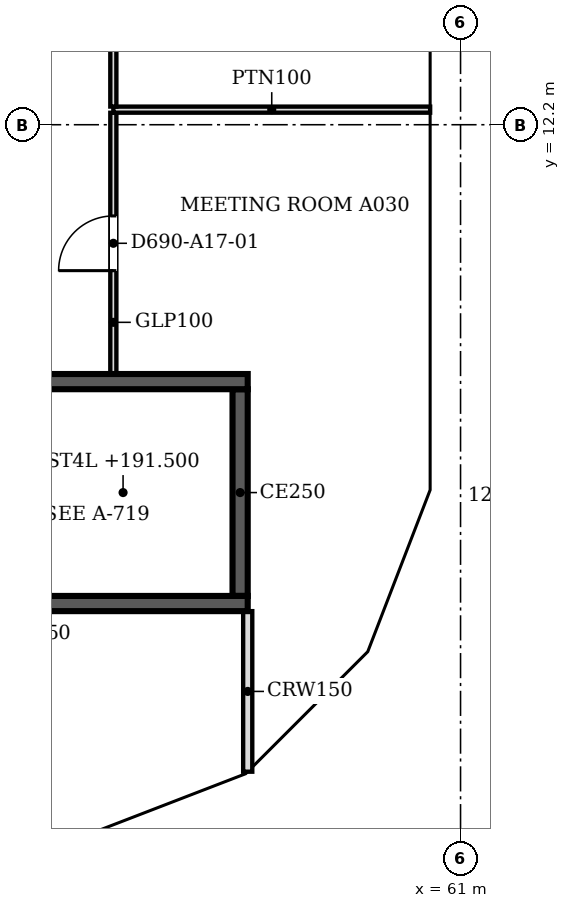
"""IFC4 building model, lengths in metres.
Left out: names, types, materials, properties, quantities, classifications, styles, units other than length and angle.
Written with IfcOpenShell. Run it as: python <this file> out.ifc"""

import sys

from ifc_helpers import new_model, si_unit, direction, frame, frame_2d, origin, place, context, subcontext, project, spatial, polyline, rectangle, outline, extrude, faceted_brep, source, transform, mapped, element, fill, save


model = new_model("IFC4")
c1 = context("Model", 3, precision=1e-05, world=origin(), true_north=direction((0.0, 1.0)))
c2 = subcontext(c1, "Body", "Model", "MODEL_VIEW")
j1 = project(units=[si_unit("LENGTHUNIT", "METRE"), si_unit("PLANEANGLEUNIT", "RADIAN")], contexts=[c1])
p1 = place(None, origin())
s1 = spatial("IfcSite", under=j1, at=p1, CompositionType="ELEMENT")
p2 = place(p1, origin())
s2 = spatial("IfcBuilding", under=s1, at=p2, CompositionType="ELEMENT")
p3 = place(p2, frame((0.0, 0.0, 189.6)))
s3 = spatial("IfcBuildingStorey", under=s2, at=p3, CompositionType="ELEMENT", Elevation=189.6)
m1 = source(origin(), c2, "Body", "Brep", [
    faceted_brep([(2.95, -0.25, 0.0), (3.003, -0.25, 0.068), (3.003, -0.25, 7.531), (2.95, -0.25, 7.6), (0.0, -0.25, 3.8), (0.047, 0.25, 3.86), (2.898, 0.25, 7.532), (2.898, 0.25, 0.068), (0.047, 0.25, 3.74), (2.95, 0.0, 0.0), (2.95, 0.0, 7.6), (0.0, 0.0, 3.8)], [[[0, 1, 2, 3, 4]], [[5, 6, 7, 8]], [[1, 0, 9]], [[10, 3, 2]], [[6, 5, 11, 4, 3, 10]], [[8, 7, 9, 0, 4, 11]], [[8, 11, 5]], [[1, 9, 7, 6, 10, 2]]]),
])
p4 = place(p3, frame((54.854, 0.25, -3.8), z_axis=(0.0, 0.0, 1.0), x_axis=(0.932970071518, 0.359953949349, 0.0)))
e1 = element("IfcWall", 1, at=p4, inside=s3, PredefinedType="SOLIDWALL", context=c2, shape_type="MappedRepresentation", body=[
    mapped(m1, transform((0.0, 0.0, 0.0), scale=1.0)),
])
m2 = source(origin(), c2, "Body", "SweptSolid", [
    extrude(outline(polyline([(2.75, 6.935), (0.316, 3.8), (2.75, 0.665), (2.75, 6.935)])), frame((0.0, 0.26, 0.0), z_axis=(0.0, -1.0, 0.0), x_axis=(1.0, 0.0, 0.0)), (0.0, 0.0, 1.0), 0.52),
])
p5 = place(p4, origin())
e2 = element("IfcOpeningElement", 2, at=p5, cuts=e1, PredefinedType="OPENING", context=c2, shape_type="MappedRepresentation", body=[
    mapped(m2, transform((0.0, 0.0, 0.0), scale=1.0)),
])
m3 = source(origin(), c2, "Body", "Brep", [
    faceted_brep([(0.053, -0.25, 0.0), (2.997, -0.25, 3.8), (0.053, -0.25, 7.6), (0.0, -0.25, 7.532), (0.0, -0.25, 0.068), (0.106, 0.25, 7.531), (2.944, 0.25, 3.868), (2.944, 0.25, 3.732), (0.106, 0.25, 0.068), (2.997, 0.0, 3.8), (0.053, 0.0, 0.0), (0.053, 0.0, 7.6)], [[[0, 1, 2, 3, 4]], [[5, 6, 7, 8]], [[8, 7, 9, 1, 0, 10]], [[6, 5, 11, 2, 1, 9]], [[3, 2, 11]], [[10, 0, 4]], [[8, 10, 4, 3, 11, 5]], [[7, 6, 9]]]),
])
p6 = place(p3, frame((57.569, 1.274, -3.8), z_axis=(0.0, 0.0, 1.0), x_axis=(0.707066050402, 0.707147509625, 0.0)))
e3 = element("IfcWall", 3, at=p6, inside=s3, PredefinedType="SOLIDWALL", context=c2, shape_type="MappedRepresentation", body=[
    mapped(m3, transform((0.0, 0.0, 0.0), scale=1.0)),
])
m4 = source(origin(), c2, "Body", "SweptSolid", [
    extrude(outline(polyline([(0.253, 0.666), (2.681, 3.8), (0.253, 6.934), (0.253, 0.666)])), frame((0.0, 0.26, 0.0), z_axis=(0.0, -1.0, 0.0), x_axis=(1.0, 0.0, 0.0)), (0.0, 0.0, 1.0), 0.52),
])
p7 = place(p6, origin())
e4 = element("IfcOpeningElement", 4, at=p7, cuts=e3, PredefinedType="OPENING", context=c2, shape_type="MappedRepresentation", body=[
    mapped(m4, transform((0.0, 0.0, 0.0), scale=1.0)),
])
m5 = source(origin(), c2, "Body", "Brep", [
    faceted_brep([(2.95, -0.25, 0.0), (2.997, -0.25, 0.059), (2.997, -0.25, 7.541), (2.95, -0.25, 7.6), (0.0, -0.25, 3.8), (0.053, 0.25, 3.868), (2.904, 0.25, 7.54), (2.904, 0.25, 0.06), (0.053, 0.25, 3.732), (2.95, 0.0, 0.0), (2.95, 0.0, 7.6), (0.0, 0.0, 3.8)], [[[0, 1, 2, 3, 4]], [[5, 6, 7, 8]], [[1, 0, 9]], [[10, 3, 2]], [[6, 5, 11, 4, 3, 10]], [[8, 7, 9, 0, 4, 11]], [[8, 11, 5]], [[1, 9, 7, 6, 10, 2]]]),
])
p8 = place(p3, frame((59.688, 3.394, -3.8), z_axis=(0.0, 0.0, 1.0), x_axis=(0.359972353723, 0.932962970624, 0.0)))
e5 = element("IfcWall", 5, at=p8, inside=s3, PredefinedType="SOLIDWALL", context=c2, shape_type="MappedRepresentation", body=[
    mapped(m5, transform((0.0, 0.0, 0.0), scale=1.0)),
])
p9 = place(p8, origin())
e6 = element("IfcOpeningElement", 6, at=p9, cuts=e5, PredefinedType="OPENING", context=c2, shape_type="MappedRepresentation", body=[
    mapped(m2, transform((0.0, 0.0, 0.0), scale=1.0)),
])
m6 = source(origin(), c2, "Body", "Brep", [
    faceted_brep([(0.047, -0.25, 0.0), (3.05, -0.25, 3.8), (0.047, -0.25, 7.6), (0.0, -0.25, 7.54), (0.0, -0.25, 0.06), (0.093, 0.25, 7.541), (3.05, 0.25, 3.8), (0.093, 0.25, 0.059), (0.047, 0.0, 0.0), (0.047, 0.0, 7.6)], [[[0, 1, 2, 3, 4]], [[5, 6, 7]], [[7, 6, 1, 0, 8]], [[6, 5, 9, 2, 1]], [[3, 2, 9]], [[8, 0, 4]], [[7, 8, 4, 3, 9, 5]]]),
])
p10 = place(p3, frame((60.75, 6.1, -3.8), z_axis=(0.0, 0.0, 1.0), x_axis=(0.0, 1.0, 0.0)))
e7 = element("IfcWall", 7, at=p10, inside=s3, PredefinedType="SOLIDWALL", context=c2, shape_type="MappedRepresentation", body=[
    mapped(m6, transform((0.0, 0.0, 0.0), scale=1.0)),
])
m7 = source(origin(), c2, "Body", "SweptSolid", [
    extrude(outline(polyline([(0.247, 0.656), (2.731, 3.8), (0.247, 6.944), (0.247, 0.656)])), frame((0.0, 0.26, 0.0), z_axis=(0.0, -1.0, 0.0), x_axis=(1.0, 0.0, 0.0)), (0.0, 0.0, 1.0), 0.52),
])
p11 = place(p10, origin())
e8 = element("IfcOpeningElement", 8, at=p11, cuts=e7, PredefinedType="OPENING", context=c2, shape_type="MappedRepresentation", body=[
    mapped(m7, transform((0.0, 0.0, 0.0), scale=1.0)),
])
m8 = source(origin(), c2, "Body", "SweptSolid", [
    extrude(outline(polyline([(3.05, 0.0), (6.1, 3.8), (3.05, 7.6), (0.0, 3.8), (3.05, 0.0)])), frame((0.0, 0.25, 0.0), z_axis=(0.0, -1.0, 0.0), x_axis=(1.0, 0.0, 0.0)), (0.0, 0.0, 1.0), 0.5),
])
p12 = place(p3, frame((60.75, 9.15, -3.8), z_axis=(0.0, 0.0, 1.0), x_axis=(0.0, 1.0, 0.0)))
e9 = element("IfcWall", 9, at=p12, inside=s3, PredefinedType="SOLIDWALL", context=c2, shape_type="MappedRepresentation", body=[
    mapped(m8, transform((0.0, 0.0, 0.0), scale=1.0)),
])
m9 = source(origin(), c2, "Body", "SweptSolid", [
    extrude(outline(polyline([(3.05, 0.399), (5.78, 3.8), (3.05, 7.2), (0.321, 3.8), (3.05, 0.399)])), frame((0.0, 0.26, 0.0), z_axis=(0.0, -1.0, 0.0), x_axis=(1.0, 0.0, 0.0)), (0.0, 0.0, 1.0), 0.52),
])
p13 = place(p12, origin())
e10 = element("IfcOpeningElement", 10, at=p13, cuts=e9, PredefinedType="OPENING", context=c2, shape_type="MappedRepresentation", body=[
    mapped(m9, transform((0.0, 0.0, 0.0), scale=1.0)),
])
m10 = source(origin(), c2, "Body", "Brep", [
    faceted_brep([(0.047, -0.25, 0.0), (2.997, -0.25, 3.8), (0.0, -0.25, 3.8), (0.0, -0.25, 0.059), (0.093, 0.25, 3.8), (2.944, 0.25, 3.8), (2.944, 0.25, 3.732), (0.093, 0.25, 0.06), (2.997, 0.0, 3.8), (0.047, 0.0, 0.0)], [[[0, 1, 2, 3]], [[4, 5, 6, 7]], [[7, 6, 8, 1, 0, 9]], [[5, 4, 2, 1, 8]], [[9, 0, 3]], [[7, 9, 3, 2, 4]], [[6, 5, 8]]]),
])
p14 = place(p3, frame((54.81, 0.233, 0.0), z_axis=(0.0, 0.0, 1.0), x_axis=(0.932990326376, 0.359901446078, 0.0)))
e11 = element("IfcWall", 11, at=p14, inside=s3, PredefinedType="SOLIDWALL", context=c2, shape_type="MappedRepresentation", body=[
    mapped(m10, transform((0.0, 0.0, 0.0), scale=1.0)),
])
m11 = source(origin(), c2, "Body", "SweptSolid", [
    extrude(outline(polyline([(0.247, 0.665), (2.487, 3.55), (0.247, 3.55), (0.247, 0.665)])), frame((0.0, 0.26, 0.0), z_axis=(0.0, -1.0, 0.0), x_axis=(1.0, 0.0, 0.0)), (0.0, 0.0, 1.0), 0.52),
])
p15 = place(p14, origin())
e12 = element("IfcOpeningElement", 12, at=p15, cuts=e11, PredefinedType="OPENING", context=c2, shape_type="MappedRepresentation", body=[
    mapped(m11, transform((0.0, 0.0, 0.0), scale=1.0)),
])
m12 = source(origin(), c2, "Body", "Brep", [
    faceted_brep([(2.944, -0.25, 0.0), (2.997, -0.25, 0.068), (2.997, -0.25, 3.8), (0.0, -0.25, 3.8), (0.053, 0.25, 3.8), (2.891, 0.25, 3.8), (2.891, 0.25, 0.068), (0.053, 0.25, 3.731), (2.944, 0.0, 0.0), (0.0, 0.0, 3.8)], [[[0, 1, 2, 3]], [[4, 5, 6, 7]], [[1, 0, 8]], [[5, 4, 9, 3, 2]], [[7, 6, 8, 0, 3, 9]], [[7, 9, 4]], [[1, 8, 6, 5, 2]]]),
])
p16 = place(p3, frame((57.606, 1.312, 0.0), z_axis=(0.0, 0.0, 1.0), x_axis=(0.707147509625, 0.707066050402, 0.0)))
e13 = element("IfcWall", 13, at=p16, inside=s3, PredefinedType="SOLIDWALL", context=c2, shape_type="MappedRepresentation", body=[
    mapped(m12, transform((0.0, 0.0, 0.0), scale=1.0)),
])
m13 = source(origin(), c2, "Body", "SweptSolid", [
    extrude(outline(polyline([(2.744, 3.55), (0.51, 3.55), (2.744, 0.666), (2.744, 3.55)])), frame((0.0, 0.26, 0.0), z_axis=(0.0, -1.0, 0.0), x_axis=(1.0, 0.0, 0.0)), (0.0, 0.0, 1.0), 0.52),
])
p17 = place(p16, origin())
e14 = element("IfcOpeningElement", 14, at=p17, cuts=e13, PredefinedType="OPENING", context=c2, shape_type="MappedRepresentation", body=[
    mapped(m13, transform((0.0, 0.0, 0.0), scale=1.0)),
])
m14 = source(origin(), c2, "Body", "Brep", [
    faceted_brep([(0.053, -0.25, 0.0), (3.003, -0.25, 3.8), (0.0, -0.25, 3.8), (0.0, -0.25, 0.068), (0.106, 0.25, 3.8), (2.957, 0.25, 3.8), (2.957, 0.25, 3.74), (0.106, 0.25, 0.068), (3.003, 0.0, 3.8), (0.053, 0.0, 0.0)], [[[0, 1, 2, 3]], [[4, 5, 6, 7]], [[7, 6, 8, 1, 0, 9]], [[5, 4, 2, 1, 8]], [[9, 0, 3]], [[7, 9, 3, 2, 4]], [[6, 5, 8]]]),
])
p18 = place(p3, frame((59.669, 3.344, 0.0), z_axis=(0.0, 0.0, 1.0), x_axis=(0.35992665181, 0.932980602862, 0.0)))
e15 = element("IfcWall", 15, at=p18, inside=s3, PredefinedType="SOLIDWALL", context=c2, shape_type="MappedRepresentation", body=[
    mapped(m14, transform((0.0, 0.0, 0.0), scale=1.0)),
])
m15 = source(origin(), c2, "Body", "SweptSolid", [
    extrude(outline(polyline([(0.253, 0.665), (2.493, 3.55), (0.253, 3.55), (0.253, 0.665)])), frame((0.0, 0.26, 0.0), z_axis=(0.0, -1.0, 0.0), x_axis=(1.0, 0.0, 0.0)), (0.0, 0.0, 1.0), 0.52),
])
p19 = place(p18, origin())
e16 = element("IfcOpeningElement", 16, at=p19, cuts=e15, PredefinedType="OPENING", context=c2, shape_type="MappedRepresentation", body=[
    mapped(m15, transform((0.0, 0.0, 0.0), scale=1.0)),
])
m16 = source(origin(), c2, "Body", "Brep", [
    faceted_brep([(3.003, -0.25, 0.0), (6.053, -0.25, 3.8), (0.0, -0.25, 3.8), (0.047, 0.25, 3.8), (6.053, 0.25, 3.8), (3.003, 0.25, 0.0), (0.047, 0.25, 3.741), (0.0, 0.0, 3.8)], [[[0, 1, 2]], [[3, 4, 5, 6]], [[5, 4, 1, 0]], [[4, 3, 7, 2, 1]], [[6, 5, 0, 2, 7]], [[6, 7, 3]]]),
])
p20 = place(p3, frame((60.75, 6.146, 0.0), z_axis=(0.0, 0.0, 1.0), x_axis=(0.0, 1.0, 0.0)))
e17 = element("IfcWall", 17, at=p20, inside=s3, PredefinedType="SOLIDWALL", context=c2, shape_type="MappedRepresentation", body=[
    mapped(m16, transform((0.0, 0.0, 0.0), scale=1.0)),
])
m17 = source(origin(), c2, "Body", "SweptSolid", [
    extrude(outline(polyline([(3.005, 0.401), (5.532, 3.55), (0.516, 3.55), (3.005, 0.401)])), frame((0.0, 0.26, 0.0), z_axis=(0.0, -1.0, 0.0), x_axis=(1.0, 0.0, 0.0)), (0.0, 0.0, 1.0), 0.52),
])
p21 = place(p20, origin())
e18 = element("IfcOpeningElement", 18, at=p21, cuts=e17, PredefinedType="OPENING", context=c2, shape_type="MappedRepresentation", body=[
    mapped(m17, transform((0.0, 0.0, 0.0), scale=1.0)),
])
m18 = source(origin(), c2, "Body", "SweptSolid", [
    extrude(outline(polyline([(3.05, 0.0), (6.1, 3.8), (0.0, 3.8), (3.05, 0.0)])), frame((0.0, 0.25, 0.0), z_axis=(0.0, -1.0, 0.0), x_axis=(1.0, 0.0, 0.0)), (0.0, 0.0, 1.0), 0.5),
])
p22 = place(p3, frame((60.75, 12.2, 0.0), z_axis=(0.0, 0.0, 1.0), x_axis=(0.0, 1.0, 0.0)))
e19 = element("IfcWall", 19, at=p22, inside=s3, PredefinedType="SOLIDWALL", context=c2, shape_type="MappedRepresentation", body=[
    mapped(m18, transform((0.0, 0.0, 0.0), scale=1.0)),
])
m19 = source(origin(), c2, "Body", "SweptSolid", [
    extrude(outline(polyline([(3.05, 0.399), (5.579, 3.55), (0.521, 3.55), (3.05, 0.399)])), frame((0.0, 0.26, 0.0), z_axis=(0.0, -1.0, 0.0), x_axis=(1.0, 0.0, 0.0)), (0.0, 0.0, 1.0), 0.52),
])
p23 = place(p22, origin())
e20 = element("IfcOpeningElement", 20, at=p23, cuts=e19, PredefinedType="OPENING", context=c2, shape_type="MappedRepresentation", body=[
    mapped(m19, transform((0.0, 0.0, 0.0), scale=1.0)),
])
p24 = place(p3, frame((57.5, 4.325, 0.0), z_axis=(0.0, 0.0, 1.0), x_axis=(-1.0, 0.0, 0.0)))
e21 = element("IfcWall", 21, at=p24, inside=s3, PredefinedType="SOLIDWALL", context=c2, shape_type="SweptSolid", body=[
    extrude(rectangle(XDim=8.5, YDim=0.25, at=frame_2d((4.25, 0.0))), origin(), (0.0, 0.0, 1.0), 3.8),
])
m20 = source(origin(), c2, "Body", "SweptSolid", [
    extrude(rectangle(XDim=1.2, YDim=2.1, at=frame_2d((0.6, 1.05))), frame((0.0, 0.135, 0.0), z_axis=(0.0, -1.0, 0.0), x_axis=(1.0, 0.0, 0.0)), (0.0, 0.0, 1.0), 0.27),
])
p25 = place(p24, frame((6.9, 0.0, 0.0)))
e22 = element("IfcOpeningElement", 22, at=p25, cuts=e21, PredefinedType="OPENING", context=c2, shape_type="MappedRepresentation", body=[
    mapped(m20, transform((0.0, 0.0, 0.0), scale=1.0)),
])
p26 = place(p3, frame((49.0, 7.975, 0.0), z_axis=(0.0, 0.0, 1.0), x_axis=(1.0, 0.0, 0.0)))
e23 = element("IfcWall", 23, at=p26, inside=s3, PredefinedType="SOLIDWALL", context=c2, shape_type="SweptSolid", body=[
    extrude(rectangle(XDim=8.5, YDim=0.25, at=frame_2d((4.25, 0.0))), origin(), (0.0, 0.0, 1.0), 3.8),
])
p27 = place(p3, frame((57.375, 7.85, 0.0), z_axis=(0.0, 0.0, 1.0), x_axis=(0.0, -1.0, 0.0)))
e24 = element("IfcWall", 24, at=p27, inside=s3, PredefinedType="SOLIDWALL", context=c2, shape_type="SweptSolid", body=[
    extrude(rectangle(XDim=3.4, YDim=0.25, at=frame_2d((1.7, 0.0))), origin(), (0.0, 0.0, 1.0), 3.8),
])
p28 = place(p3, frame((57.5, 1.559, 0.0), z_axis=(0.0, 0.0, 1.0), x_axis=(0.0, 1.0, 0.0)))
e25 = element("IfcWall", 25, at=p28, inside=s3, PredefinedType="PARTITIONING", context=c2, shape_type="SweptSolid", body=[
    extrude(rectangle(XDim=2.641, YDim=0.15, at=frame_2d((1.32, 0.0))), origin(), (0.0, 0.0, 1.0), 2.947),
])
p29 = place(p3, frame((55.29, 12.397, 0.0), z_axis=(0.0, 0.0, 1.0), x_axis=(0.0, -1.0, 0.0)))
e26 = element("IfcWall", 26, at=p29, inside=s3, PredefinedType="PARTITIONING", context=c2, shape_type="SweptSolid", body=[
    extrude(rectangle(XDim=4.297, YDim=0.1, at=frame_2d((2.148, 0.0))), origin(), (0.0, 0.0, 1.0), 2.947),
])
m21 = source(origin(), c2, "Body", "SweptSolid", [
    extrude(rectangle(XDim=0.9, YDim=2.1, at=frame_2d((0.45, 1.05))), frame((0.0, 0.06, 0.0), z_axis=(0.0, -1.0, 0.0), x_axis=(1.0, 0.0, 0.0)), (0.0, 0.0, 1.0), 0.12),
])
p30 = place(p29, frame((1.697, 0.0, 0.0)))
e27 = element("IfcOpeningElement", 27, at=p30, cuts=e26, PredefinedType="OPENING", context=c2, shape_type="MappedRepresentation", body=[
    mapped(m21, transform((0.0, 0.0, 0.0), scale=1.0)),
])
p31 = place(p3, frame((55.29, 12.448, 0.0), z_axis=(0.0, 0.0, 1.0), x_axis=(1.0, 0.0, 0.0)))
e28 = element("IfcWall", 28, at=p31, inside=s3, PredefinedType="PARTITIONING", context=c2, shape_type="SweptSolid", body=[
    extrude(rectangle(XDim=5.21, YDim=0.1, at=frame_2d((2.605, 0.0))), origin(), (0.0, 0.0, 1.0), 2.947),
])
p32 = place(p3, frame((55.29, 17.024, 0.0), z_axis=(0.0, 0.0, 1.0), x_axis=(0.0, -1.0, 0.0)))
e29 = element("IfcWall", 29, at=p32, inside=s3, PredefinedType="PARTITIONING", context=c2, shape_type="SweptSolid", body=[
    extrude(rectangle(XDim=4.525, YDim=0.1, at=frame_2d((2.263, 0.0))), origin(), (0.0, 0.0, 1.0), 2.947),
])
p33 = place(p32, frame((1.825, 0.0, 0.0)))
e30 = element("IfcOpeningElement", 30, at=p33, cuts=e29, PredefinedType="OPENING", context=c2, shape_type="MappedRepresentation", body=[
    mapped(m21, transform((0.0, 0.0, 0.0), scale=1.0)),
])
m22 = source(origin(), c2, "Body", "SweptSolid", [
    extrude(rectangle(XDim=0.9, YDim=2.1, at=frame_2d((0.45, 1.05))), frame((0.0, 0.025, 0.0), z_axis=(0.0, -1.0, 0.0), x_axis=(1.0, 0.0, 0.0)), (0.0, 0.0, 1.0), 0.05),
])
p34 = place(p30, origin())
e31 = element("IfcDoor", 31, at=p34, inside=s3, OperationType="SINGLE_SWING_RIGHT", PredefinedType="DOOR", context=c2, shape_type="MappedRepresentation", body=[
    mapped(m22, transform((0.0, 0.0, 0.0), scale=1.0)),
])
fill(e27, e31)
save(model, sys.argv[1])
